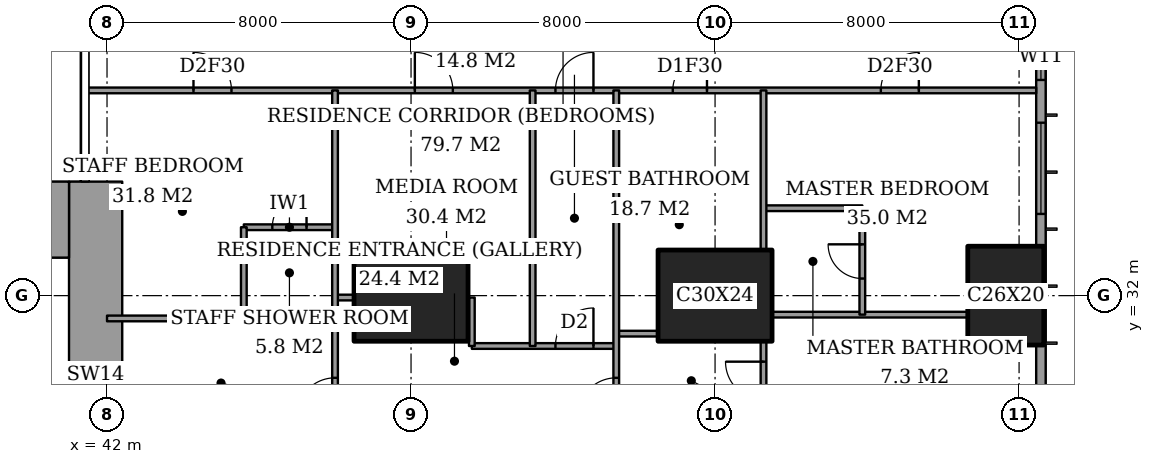
"""IFC4 building model, lengths in metres.
Left out: names, types, materials, properties, quantities, classifications, styles, units other than length and angle.
Written with IfcOpenShell. Run it as: python <this file> out.ifc"""

import sys

from ifc_helpers import new_model, si_unit, direction, frame, frame_2d, origin, origin_2d, place, context, subcontext, project, spatial, rectangle, extrude, element, fill, save


model = new_model("IFC4")
c1 = context("Model", 3, precision=1e-05, world=origin(), true_north=direction((0.0, 1.0)))
c2 = subcontext(c1, "Body", "Model", "MODEL_VIEW")
j1 = project(units=[si_unit("LENGTHUNIT", "METRE"), si_unit("PLANEANGLEUNIT", "RADIAN")], contexts=[c1])
p1 = place(None, origin())
s1 = spatial("IfcSite", under=j1, at=p1, CompositionType="ELEMENT")
p2 = place(p1, origin())
s2 = spatial("IfcBuilding", under=s1, at=p2, CompositionType="ELEMENT")
p3 = place(p2, frame((0.0, 0.0, 135.8)))
s3 = spatial("IfcBuildingStorey", under=s2, at=p3, CompositionType="ELEMENT", Elevation=135.8)
for number, where, z_axis, x_axis in (
    (1, (50.0, 32.0, 0.0), (0.0, 0.0, 1.0), (1.0, 0.0, 0.0)),
    (2, (58.0, 32.0, 0.0), (0.0, 0.0, 1.0), (1.0, 0.0, 0.0)),
):
    element("IfcColumn", number, at=place(p3, frame(where, z_axis=z_axis, x_axis=x_axis)), inside=s3, PredefinedType="COLUMN", context=c2, shape_type="SweptSolid", body=[
        extrude(rectangle(XDim=3.0, YDim=2.4, at=origin_2d()), origin(), (0.0, 0.0, 1.0), 3.6),
    ])
p4 = place(p3, frame((65.65, 32.0, 0.0), z_axis=(0.0, 0.0, 1.0), x_axis=(0.0, 1.0, 0.0)))
e3 = element("IfcColumn", 3, at=p4, inside=s3, PredefinedType="COLUMN", context=c2, shape_type="SweptSolid", body=[
    extrude(rectangle(XDim=2.6, YDim=2.0, at=origin_2d()), origin(), (0.0, 0.0, 1.0), 3.6),
])
p5 = place(p3, frame((37.85, 34.0, 0.0), z_axis=(0.0, 0.0, 1.0), x_axis=(1.0, 0.0, 0.0)))
e4 = element("IfcWall", 4, at=p5, inside=s3, PredefinedType="SHEAR", context=c2, shape_type="SweptSolid", body=[
    extrude(rectangle(XDim=3.15, YDim=2.0, at=frame_2d((1.575, 0.0))), origin(), (0.0, 0.0, 1.0), 3.6),
])
p6 = place(p3, frame((41.7, 24.85, 0.0), z_axis=(0.0, 0.0, 1.0), x_axis=(0.0, 1.0, 0.0)))
e5 = element("IfcWall", 5, at=p6, inside=s3, PredefinedType="SHEAR", context=c2, shape_type="SweptSolid", body=[
    extrude(rectangle(XDim=10.15, YDim=1.4, at=frame_2d((5.075, 0.0))), origin(), (0.0, 0.0, 1.0), 3.6),
])
p7 = place(p3, frame((66.575, 3.175, 0.0), z_axis=(0.0, 0.0, 1.0), x_axis=(0.0, 1.0, 0.0)))
e6 = element("IfcWall", 6, at=p7, inside=s3, PredefinedType="SOLIDWALL", context=c2, shape_type="SweptSolid", body=[
    extrude(rectangle(XDim=41.65, YDim=0.25, at=frame_2d((20.825, 0.0))), origin(), (0.0, 0.0, 1.0), 3.6),
])
p8 = place(p7, frame((0.775, 0.0, 0.4)))
e7 = element("IfcOpeningElement", 7, at=p8, cuts=e6, PredefinedType="OPENING", context=c2, shape_type="SweptSolid", body=[
    extrude(rectangle(XDim=2.4, YDim=2.2, at=frame_2d((1.2, 1.1))), frame((0.0, 0.135, 0.0), z_axis=(0.0, -1.0, 0.0), x_axis=(1.0, 0.0, 0.0)), (0.0, 0.0, 1.0), 0.27),
])
p9 = place(p7, frame((6.1, 0.0, 0.4)))
e8 = element("IfcOpeningElement", 8, at=p9, cuts=e6, PredefinedType="OPENING", context=c2, shape_type="SweptSolid", body=[
    extrude(rectangle(XDim=1.2, YDim=2.2, at=frame_2d((0.6, 1.1))), frame((0.0, 0.135, 0.0), z_axis=(0.0, -1.0, 0.0), x_axis=(1.0, 0.0, 0.0)), (0.0, 0.0, 1.0), 0.27),
])
p10 = place(p7, frame((8.275, 0.0, 0.4)))
e9 = element("IfcOpeningElement", 9, at=p10, cuts=e6, PredefinedType="OPENING", context=c2, shape_type="SweptSolid", body=[
    extrude(rectangle(XDim=2.4, YDim=2.2, at=frame_2d((1.2, 1.1))), frame((0.0, 0.135, 0.0), z_axis=(0.0, -1.0, 0.0), x_axis=(1.0, 0.0, 0.0)), (0.0, 0.0, 1.0), 0.27),
])
p11 = place(p7, frame((15.775, 0.0, 0.4)))
e10 = element("IfcOpeningElement", 10, at=p11, cuts=e6, PredefinedType="OPENING", context=c2, shape_type="SweptSolid", body=[
    extrude(rectangle(XDim=2.4, YDim=2.2, at=frame_2d((1.2, 1.1))), frame((0.0, 0.135, 0.0), z_axis=(0.0, -1.0, 0.0), x_axis=(1.0, 0.0, 0.0)), (0.0, 0.0, 1.0), 0.27),
])
p12 = place(p7, frame((23.475, 0.0, 0.4)))
e11 = element("IfcOpeningElement", 11, at=p12, cuts=e6, PredefinedType="OPENING", context=c2, shape_type="SweptSolid", body=[
    extrude(rectangle(XDim=2.4, YDim=2.2, at=frame_2d((1.2, 1.1))), frame((0.0, 0.135, 0.0), z_axis=(0.0, -1.0, 0.0), x_axis=(1.0, 0.0, 0.0)), (0.0, 0.0, 1.0), 0.27),
])
p13 = place(p7, frame((30.975, 0.0, 0.4)))
e12 = element("IfcOpeningElement", 12, at=p13, cuts=e6, PredefinedType="OPENING", context=c2, shape_type="SweptSolid", body=[
    extrude(rectangle(XDim=2.4, YDim=2.2, at=frame_2d((1.2, 1.1))), frame((0.0, 0.135, 0.0), z_axis=(0.0, -1.0, 0.0), x_axis=(1.0, 0.0, 0.0)), (0.0, 0.0, 1.0), 0.27),
])
p14 = place(p7, frame((34.5, 0.0, 0.4)))
e13 = element("IfcOpeningElement", 13, at=p14, cuts=e6, PredefinedType="OPENING", context=c2, shape_type="SweptSolid", body=[
    extrude(rectangle(XDim=1.2, YDim=2.2, at=frame_2d((0.6, 1.1))), frame((0.0, 0.135, 0.0), z_axis=(0.0, -1.0, 0.0), x_axis=(1.0, 0.0, 0.0)), (0.0, 0.0, 1.0), 0.27),
])
p15 = place(p7, frame((38.475, 0.0, 0.4)))
e14 = element("IfcOpeningElement", 14, at=p15, cuts=e6, PredefinedType="OPENING", context=c2, shape_type="SweptSolid", body=[
    extrude(rectangle(XDim=2.4, YDim=2.2, at=frame_2d((1.2, 1.1))), frame((0.0, 0.135, 0.0), z_axis=(0.0, -1.0, 0.0), x_axis=(1.0, 0.0, 0.0)), (0.0, 0.0, 1.0), 0.27),
])
p16 = place(p3, frame((51.6, 30.675, 0.0), z_axis=(0.0, 0.0, 1.0), x_axis=(1.0, 0.0, 0.0)))
e15 = element("IfcWall", 15, at=p16, inside=s3, PredefinedType="PARTITIONING", context=c2, shape_type="SweptSolid", body=[
    extrude(rectangle(XDim=3.8, YDim=0.15, at=frame_2d((1.9, 0.0))), origin(), (0.0, 0.0, 1.0), 3.35),
])
p17 = place(p16, frame((2.2, 0.0, 0.0)))
e16 = element("IfcOpeningElement", 16, at=p17, cuts=e15, PredefinedType="OPENING", context=c2, shape_type="SweptSolid", body=[
    extrude(rectangle(XDim=1.0, YDim=2.1, at=frame_2d((0.5, 1.05))), frame((0.0, 0.085, 0.0), z_axis=(0.0, -1.0, 0.0), x_axis=(1.0, 0.0, 0.0)), (0.0, 0.0, 1.0), 0.17),
])
p18 = place(p3, frame((55.4, 31.0, 0.0), z_axis=(0.0, 0.0, 1.0), x_axis=(1.0, 0.0, 0.0)))
e17 = element("IfcWall", 17, at=p18, inside=s3, PredefinedType="PARTITIONING", context=c2, shape_type="SweptSolid", body=[
    extrude(rectangle(XDim=1.1, YDim=0.15, at=frame_2d((0.55, 0.0))), origin(), (0.0, 0.0, 1.0), 3.35),
])
p19 = place(p3, frame((42.0, 31.4, 0.0), z_axis=(0.0, 0.0, 1.0), x_axis=(1.0, 0.0, 0.0)))
e18 = element("IfcWall", 18, at=p19, inside=s3, PredefinedType="PARTITIONING", context=c2, shape_type="SweptSolid", body=[
    extrude(rectangle(XDim=6.0, YDim=0.15, at=frame_2d((3.0, 0.0))), origin(), (0.0, 0.0, 1.0), 3.35),
])
p20 = place(p3, frame((59.5, 31.5, 0.0), z_axis=(0.0, 0.0, 1.0), x_axis=(1.0, 0.0, 0.0)))
e19 = element("IfcWall", 19, at=p20, inside=s3, PredefinedType="PARTITIONING", context=c2, shape_type="SweptSolid", body=[
    extrude(rectangle(XDim=5.15, YDim=0.15, at=frame_2d((2.575, 0.0))), origin(), (0.0, 0.0, 1.0), 3.35),
])
p21 = place(p3, frame((48.0, 31.95, 0.0), z_axis=(0.0, 0.0, 1.0), x_axis=(1.0, 0.0, 0.0)))
e20 = element("IfcWall", 20, at=p21, inside=s3, PredefinedType="PARTITIONING", context=c2, shape_type="SweptSolid", body=[
    extrude(rectangle(XDim=0.5, YDim=0.15, at=frame_2d((0.25, 0.0))), origin(), (0.0, 0.0, 1.0), 2.634),
])
p22 = place(p3, frame((45.6, 33.8, 0.0), z_axis=(0.0, 0.0, 1.0), x_axis=(1.0, 0.0, 0.0)))
e21 = element("IfcWall", 21, at=p22, inside=s3, PredefinedType="PARTITIONING", context=c2, shape_type="SweptSolid", body=[
    extrude(rectangle(XDim=2.4, YDim=0.15, at=frame_2d((1.2, 0.0))), origin(), (0.0, 0.0, 1.0), 3.35),
])
p23 = place(p22, frame((0.75, 0.0, 0.0)))
e22 = element("IfcOpeningElement", 22, at=p23, cuts=e21, PredefinedType="OPENING", context=c2, shape_type="SweptSolid", body=[
    extrude(rectangle(XDim=0.9, YDim=2.1, at=frame_2d((0.45, 1.05))), frame((0.0, 0.085, 0.0), z_axis=(0.0, -1.0, 0.0), x_axis=(1.0, 0.0, 0.0)), (0.0, 0.0, 1.0), 0.17),
])
p24 = place(p3, frame((59.275, 34.3, 0.0), z_axis=(0.0, 0.0, 1.0), x_axis=(1.0, 0.0, 0.0)))
e23 = element("IfcWall", 23, at=p24, inside=s3, PredefinedType="PARTITIONING", context=c2, shape_type="SweptSolid", body=[
    extrude(rectangle(XDim=2.6, YDim=0.15, at=frame_2d((1.3, 0.0))), origin(), (0.0, 0.0, 1.0), 3.35),
])
p25 = place(p3, frame((41.439, 37.4, 0.0), z_axis=(0.0, 0.0, 1.0), x_axis=(1.0, 0.0, 0.0)))
e24 = element("IfcWall", 24, at=p25, inside=s3, PredefinedType="PARTITIONING", context=c2, shape_type="SweptSolid", body=[
    extrude(rectangle(XDim=25.011, YDim=0.15, at=frame_2d((12.505, 0.0))), origin(), (0.0, 0.0, 1.0), 3.35),
])
p26 = place(p25, frame((12.361, 0.0, 0.0)))
e25 = element("IfcOpeningElement", 25, at=p26, cuts=e24, PredefinedType="OPENING", context=c2, shape_type="SweptSolid", body=[
    extrude(rectangle(XDim=1.0, YDim=2.1, at=frame_2d((0.5, 1.05))), frame((0.0, 0.085, 0.0), z_axis=(0.0, -1.0, 0.0), x_axis=(1.0, 0.0, 0.0)), (0.0, 0.0, 1.0), 0.17),
])
p27 = place(p25, frame((20.924, 0.0, 0.0)))
e26 = element("IfcOpeningElement", 26, at=p27, cuts=e24, PredefinedType="OPENING", context=c2, shape_type="SweptSolid", body=[
    extrude(rectangle(XDim=1.0, YDim=2.1, at=frame_2d((0.5, 1.05))), frame((0.0, 0.085, 0.0), z_axis=(0.0, -1.0, 0.0), x_axis=(1.0, 0.0, 0.0)), (0.0, 0.0, 1.0), 0.17),
])
p28 = place(p25, frame((15.448, 0.0, 0.0)))
e27 = element("IfcOpeningElement", 27, at=p28, cuts=e24, PredefinedType="OPENING", context=c2, shape_type="SweptSolid", body=[
    extrude(rectangle(XDim=0.9, YDim=2.1, at=frame_2d((0.45, 1.05))), frame((0.0, 0.085, 0.0), z_axis=(0.0, -1.0, 0.0), x_axis=(1.0, 0.0, 0.0)), (0.0, 0.0, 1.0), 0.17),
])
p29 = place(p25, frame((8.661, 0.0, 0.0)))
e28 = element("IfcOpeningElement", 28, at=p29, cuts=e24, PredefinedType="OPENING", context=c2, shape_type="SweptSolid", body=[
    extrude(rectangle(XDim=1.0, YDim=2.1, at=frame_2d((0.5, 1.05))), frame((0.0, 0.085, 0.0), z_axis=(0.0, -1.0, 0.0), x_axis=(1.0, 0.0, 0.0)), (0.0, 0.0, 1.0), 0.17),
])
p30 = place(p25, frame((2.836, 0.0, 0.0)))
e29 = element("IfcOpeningElement", 29, at=p30, cuts=e24, PredefinedType="OPENING", context=c2, shape_type="SweptSolid", body=[
    extrude(rectangle(XDim=1.0, YDim=2.1, at=frame_2d((0.5, 1.05))), frame((0.0, 0.085, 0.0), z_axis=(0.0, -1.0, 0.0), x_axis=(1.0, 0.0, 0.0)), (0.0, 0.0, 1.0), 0.17),
])
p31 = place(p3, frame((45.6, 31.4, 0.0), z_axis=(0.0, 0.0, 1.0), x_axis=(0.0, 1.0, 0.0)))
e30 = element("IfcWall", 30, at=p31, inside=s3, PredefinedType="PARTITIONING", context=c2, shape_type="SweptSolid", body=[
    extrude(rectangle(XDim=2.4, YDim=0.15, at=frame_2d((1.2, 0.0))), origin(), (0.0, 0.0, 1.0), 3.35),
])
p32 = place(p3, frame((48.0, 28.0, 0.0), z_axis=(0.0, 0.0, 1.0), x_axis=(0.0, 1.0, 0.0)))
e31 = element("IfcWall", 31, at=p32, inside=s3, PredefinedType="PARTITIONING", context=c2, shape_type="SweptSolid", body=[
    extrude(rectangle(XDim=9.4, YDim=0.15, at=frame_2d((4.7, 0.0))), origin(), (0.0, 0.0, 1.0), 3.35),
])
p33 = place(p32, frame((0.837, 0.0, 0.0)))
e32 = element("IfcOpeningElement", 32, at=p33, cuts=e31, PredefinedType="OPENING", context=c2, shape_type="SweptSolid", body=[
    extrude(rectangle(XDim=1.0, YDim=2.1, at=frame_2d((0.5, 1.05))), frame((0.0, 0.085, 0.0), z_axis=(0.0, -1.0, 0.0), x_axis=(1.0, 0.0, 0.0)), (0.0, 0.0, 1.0), 0.17),
])
p34 = place(p3, frame((51.6, 30.675, 0.0), z_axis=(0.0, 0.0, 1.0), x_axis=(0.0, 1.0, 0.0)))
e33 = element("IfcWall", 33, at=p34, inside=s3, PredefinedType="PARTITIONING", context=c2, shape_type="SweptSolid", body=[
    extrude(rectangle(XDim=1.275, YDim=0.15, at=frame_2d((0.637, 0.0))), origin(), (0.0, 0.0, 1.0), 3.35),
])
p35 = place(p3, frame((53.2, 30.675, 0.0), z_axis=(0.0, 0.0, 1.0), x_axis=(0.0, 1.0, 0.0)))
e34 = element("IfcWall", 34, at=p35, inside=s3, PredefinedType="PARTITIONING", context=c2, shape_type="SweptSolid", body=[
    extrude(rectangle(XDim=6.725, YDim=0.15, at=frame_2d((3.362, 0.0))), origin(), (0.0, 0.0, 1.0), 3.35),
])
p36 = place(p3, frame((55.4, 28.0, 0.0), z_axis=(0.0, 0.0, 1.0), x_axis=(0.0, 1.0, 0.0)))
e35 = element("IfcWall", 35, at=p36, inside=s3, PredefinedType="PARTITIONING", context=c2, shape_type="SweptSolid", body=[
    extrude(rectangle(XDim=9.4, YDim=0.15, at=frame_2d((4.7, 0.0))), origin(), (0.0, 0.0, 1.0), 3.35),
])
p37 = place(p36, frame((0.837, 0.0, 0.0)))
e36 = element("IfcOpeningElement", 36, at=p37, cuts=e35, PredefinedType="OPENING", context=c2, shape_type="SweptSolid", body=[
    extrude(rectangle(XDim=1.0, YDim=2.1, at=frame_2d((0.5, 1.05))), frame((0.0, 0.085, 0.0), z_axis=(0.0, -1.0, 0.0), x_axis=(1.0, 0.0, 0.0)), (0.0, 0.0, 1.0), 0.17),
])
p38 = place(p3, frame((59.275, 28.35, 0.0), z_axis=(0.0, 0.0, 1.0), x_axis=(0.0, 1.0, 0.0)))
e37 = element("IfcWall", 37, at=p38, inside=s3, PredefinedType="PARTITIONING", context=c2, shape_type="SweptSolid", body=[
    extrude(rectangle(XDim=2.45, YDim=0.15, at=frame_2d((1.225, 0.0))), origin(), (0.0, 0.0, 1.0), 3.35),
])
p39 = place(p38, frame((0.913, 0.0, 0.0)))
e38 = element("IfcOpeningElement", 38, at=p39, cuts=e37, PredefinedType="OPENING", context=c2, shape_type="SweptSolid", body=[
    extrude(rectangle(XDim=1.0, YDim=2.1, at=frame_2d((0.5, 1.05))), frame((0.0, 0.085, 0.0), z_axis=(0.0, -1.0, 0.0), x_axis=(1.0, 0.0, 0.0)), (0.0, 0.0, 1.0), 0.17),
])
p40 = place(p3, frame((59.275, 33.2, 0.0), z_axis=(0.0, 0.0, 1.0), x_axis=(0.0, 1.0, 0.0)))
e39 = element("IfcWall", 39, at=p40, inside=s3, PredefinedType="PARTITIONING", context=c2, shape_type="SweptSolid", body=[
    extrude(rectangle(XDim=4.2, YDim=0.15, at=frame_2d((2.1, 0.0))), origin(), (0.0, 0.0, 1.0), 3.35),
])
p41 = place(p3, frame((61.875, 31.5, 0.0), z_axis=(0.0, 0.0, 1.0), x_axis=(0.0, 1.0, 0.0)))
e40 = element("IfcWall", 40, at=p41, inside=s3, PredefinedType="PARTITIONING", context=c2, shape_type="SweptSolid", body=[
    extrude(rectangle(XDim=2.8, YDim=0.15, at=frame_2d((1.4, 0.0))), origin(), (0.0, 0.0, 1.0), 3.35),
])
p42 = place(p41, frame((0.95, 0.0, 0.0)))
e41 = element("IfcOpeningElement", 41, at=p42, cuts=e40, PredefinedType="OPENING", context=c2, shape_type="SweptSolid", body=[
    extrude(rectangle(XDim=0.9, YDim=2.1, at=frame_2d((0.45, 1.05))), frame((0.0, 0.085, 0.0), z_axis=(0.0, -1.0, 0.0), x_axis=(1.0, 0.0, 0.0)), (0.0, 0.0, 1.0), 0.17),
])
p43 = place(p13, origin())
e42 = element("IfcWindow", 42, at=p43, inside=s3, PartitioningType="SINGLE_PANEL", PredefinedType="WINDOW", context=c2, shape_type="SweptSolid", body=[
    extrude(rectangle(XDim=2.4, YDim=2.2, at=frame_2d((1.2, 1.1))), frame((0.0, 0.03, 0.0), z_axis=(0.0, -1.0, 0.0), x_axis=(1.0, 0.0, 0.0)), (0.0, 0.0, 1.0), 0.06),
])
fill(e12, e42)
p44 = place(p14, origin())
e43 = element("IfcWindow", 43, at=p44, inside=s3, PartitioningType="SINGLE_PANEL", PredefinedType="WINDOW", context=c2, shape_type="SweptSolid", body=[
    extrude(rectangle(XDim=1.2, YDim=2.2, at=frame_2d((0.6, 1.1))), frame((0.0, 0.03, 0.0), z_axis=(0.0, -1.0, 0.0), x_axis=(1.0, 0.0, 0.0)), (0.0, 0.0, 1.0), 0.06),
])
fill(e13, e43)
p45 = place(p26, origin())
e44 = element("IfcDoor", 44, at=p45, inside=s3, OperationType="SINGLE_SWING_LEFT", PredefinedType="DOOR", context=c2, shape_type="SweptSolid", body=[
    extrude(rectangle(XDim=1.0, YDim=2.1, at=frame_2d((0.5, 1.05))), frame((0.0, 0.025, 0.0), z_axis=(0.0, -1.0, 0.0), x_axis=(1.0, 0.0, 0.0)), (0.0, 0.0, 1.0), 0.05),
])
fill(e25, e44)
p46 = place(p42, origin())
e45 = element("IfcDoor", 45, at=p46, inside=s3, OperationType="SINGLE_SWING_LEFT", PredefinedType="DOOR", context=c2, shape_type="SweptSolid", body=[
    extrude(rectangle(XDim=0.9, YDim=2.1, at=frame_2d((0.45, 1.05))), frame((0.0, 0.025, 0.0), z_axis=(0.0, -1.0, 0.0), x_axis=(1.0, 0.0, 0.0)), (0.0, 0.0, 1.0), 0.05),
])
fill(e41, e45)
p47 = place(p27, origin())
e46 = element("IfcDoor", 46, at=p47, inside=s3, OperationType="SINGLE_SWING_LEFT", PredefinedType="DOOR", context=c2, shape_type="SweptSolid", body=[
    extrude(rectangle(XDim=1.0, YDim=2.1, at=frame_2d((0.5, 1.05))), frame((0.0, 0.025, 0.0), z_axis=(0.0, -1.0, 0.0), x_axis=(1.0, 0.0, 0.0)), (0.0, 0.0, 1.0), 0.05),
])
fill(e26, e46)
p48 = place(p39, origin())
e47 = element("IfcDoor", 47, at=p48, inside=s3, OperationType="SINGLE_SWING_LEFT", PredefinedType="DOOR", context=c2, shape_type="SweptSolid", body=[
    extrude(rectangle(XDim=1.0, YDim=2.1, at=frame_2d((0.5, 1.05))), frame((0.0, 0.025, 0.0), z_axis=(0.0, -1.0, 0.0), x_axis=(1.0, 0.0, 0.0)), (0.0, 0.0, 1.0), 0.05),
])
fill(e38, e47)
p49 = place(p28, origin())
e48 = element("IfcDoor", 48, at=p49, inside=s3, OperationType="SINGLE_SWING_LEFT", PredefinedType="DOOR", context=c2, shape_type="SweptSolid", body=[
    extrude(rectangle(XDim=0.9, YDim=2.1, at=frame_2d((0.45, 1.05))), frame((0.0, 0.025, 0.0), z_axis=(0.0, -1.0, 0.0), x_axis=(1.0, 0.0, 0.0)), (0.0, 0.0, 1.0), 0.05),
])
fill(e27, e48)
p50 = place(p37, origin())
e49 = element("IfcDoor", 49, at=p50, inside=s3, OperationType="SINGLE_SWING_RIGHT", PredefinedType="DOOR", context=c2, shape_type="SweptSolid", body=[
    extrude(rectangle(XDim=1.0, YDim=2.1, at=frame_2d((0.5, 1.05))), frame((0.0, 0.025, 0.0), z_axis=(0.0, -1.0, 0.0), x_axis=(1.0, 0.0, 0.0)), (0.0, 0.0, 1.0), 0.05),
])
fill(e36, e49)
p51 = place(p17, origin())
e50 = element("IfcDoor", 50, at=p51, inside=s3, OperationType="SINGLE_SWING_LEFT", PredefinedType="DOOR", context=c2, shape_type="SweptSolid", body=[
    extrude(rectangle(XDim=1.0, YDim=2.1, at=frame_2d((0.5, 1.05))), frame((0.0, 0.025, 0.0), z_axis=(0.0, -1.0, 0.0), x_axis=(1.0, 0.0, 0.0)), (0.0, 0.0, 1.0), 0.05),
])
fill(e16, e50)
p52 = place(p29, origin())
e51 = element("IfcDoor", 51, at=p52, inside=s3, OperationType="SINGLE_SWING_RIGHT", PredefinedType="DOOR", context=c2, shape_type="SweptSolid", body=[
    extrude(rectangle(XDim=1.0, YDim=2.1, at=frame_2d((0.5, 1.05))), frame((0.0, 0.025, 0.0), z_axis=(0.0, -1.0, 0.0), x_axis=(1.0, 0.0, 0.0)), (0.0, 0.0, 1.0), 0.05),
])
fill(e28, e51)
p53 = place(p23, origin())
e52 = element("IfcDoor", 52, at=p53, inside=s3, OperationType="SINGLE_SWING_LEFT", PredefinedType="DOOR", context=c2, shape_type="SweptSolid", body=[
    extrude(rectangle(XDim=0.9, YDim=2.1, at=frame_2d((0.45, 1.05))), frame((0.0, 0.025, 0.0), z_axis=(0.0, -1.0, 0.0), x_axis=(1.0, 0.0, 0.0)), (0.0, 0.0, 1.0), 0.05),
])
fill(e22, e52)
p54 = place(p30, origin())
e53 = element("IfcDoor", 53, at=p54, inside=s3, OperationType="SINGLE_SWING_RIGHT", PredefinedType="DOOR", context=c2, shape_type="SweptSolid", body=[
    extrude(rectangle(XDim=1.0, YDim=2.1, at=frame_2d((0.5, 1.05))), frame((0.0, 0.025, 0.0), z_axis=(0.0, -1.0, 0.0), x_axis=(1.0, 0.0, 0.0)), (0.0, 0.0, 1.0), 0.05),
])
fill(e29, e53)
p55 = place(p33, origin())
e54 = element("IfcDoor", 54, at=p55, inside=s3, OperationType="SINGLE_SWING_RIGHT", PredefinedType="DOOR", context=c2, shape_type="SweptSolid", body=[
    extrude(rectangle(XDim=1.0, YDim=2.1, at=frame_2d((0.5, 1.05))), frame((0.0, 0.025, 0.0), z_axis=(0.0, -1.0, 0.0), x_axis=(1.0, 0.0, 0.0)), (0.0, 0.0, 1.0), 0.05),
])
fill(e32, e54)
save(model, sys.argv[1])
